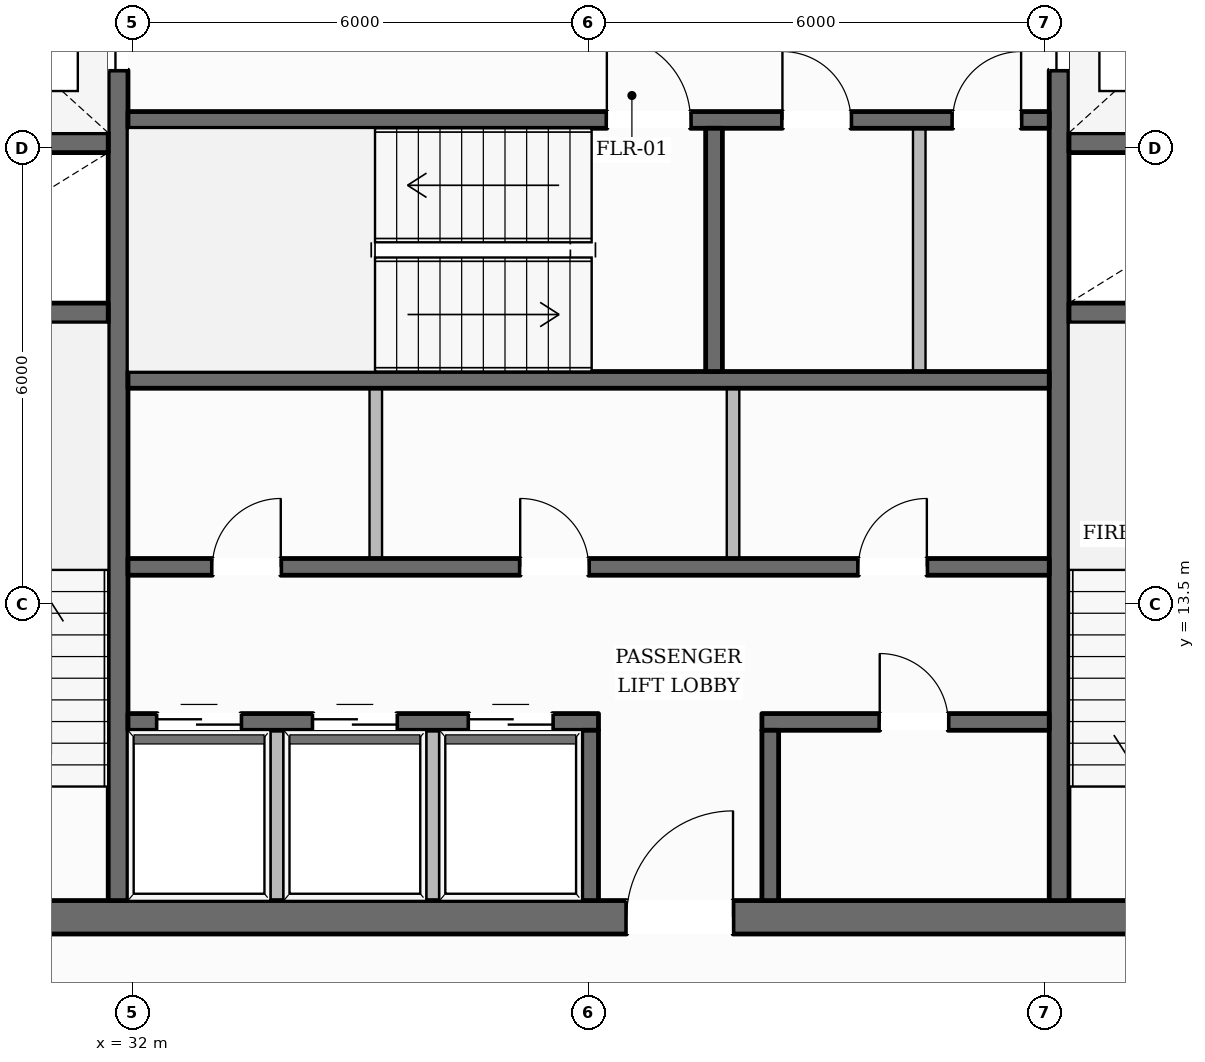
"""IFC4 building model, lengths in metres.
Left out: names, types, materials, properties, quantities, classifications, styles, units other than length and angle.
Written with IfcOpenShell. Run it as: python <this file> out.ifc"""

import sys

from ifc_helpers import new_model, si_unit, direction, frame, frame_2d, origin, place, context, subcontext, project, spatial, rectangle, extrude, element, fill, save


model = new_model("IFC4")
c1 = context("Model", 3, precision=1e-05, world=origin(), true_north=direction((0.0, 1.0)))
c2 = subcontext(c1, "Body", "Model", "MODEL_VIEW")
j1 = project(units=[si_unit("LENGTHUNIT", "METRE"), si_unit("PLANEANGLEUNIT", "RADIAN")], contexts=[c1])
p1 = place(None, origin())
s1 = spatial("IfcSite", under=j1, at=p1, CompositionType="ELEMENT")
p2 = place(p1, origin())
s2 = spatial("IfcBuilding", under=s1, at=p2, CompositionType="ELEMENT")
p3 = place(p2, frame((0.0, 0.0, 218.9)))
s3 = spatial("IfcBuildingStorey", under=s2, at=p3, CompositionType="ELEMENT", Elevation=218.9)
p4 = place(p3, frame((28.04, 9.38, 0.0), z_axis=(0.0, 0.0, 1.0), x_axis=(1.0, 0.0, 0.0)))
e1 = element("IfcWall", 1, at=p4, inside=s3, PredefinedType="SOLIDWALL", context=c2, shape_type="SweptSolid", body=[
    extrude(rectangle(XDim=19.92, YDim=0.44, at=frame_2d((9.96, 0.0))), origin(), (0.0, 0.0, 1.0), 3.6),
])
p5 = place(p4, frame((10.46, 0.0, 0.0)))
e2 = element("IfcOpeningElement", 2, at=p5, cuts=e1, PredefinedType="OPENING", context=c2, shape_type="SweptSolid", body=[
    extrude(rectangle(XDim=1.4, YDim=2.2, at=frame_2d((0.7, 1.1))), frame((0.0, 0.23, 0.0), z_axis=(0.0, -1.0, 0.0), x_axis=(1.0, 0.0, 0.0)), (0.0, 0.0, 1.0), 0.46),
])
p6 = place(p3, frame((31.81, 9.6, 0.0), z_axis=(0.0, 0.0, 1.0), x_axis=(0.0, 1.0, 0.0)))
e3 = element("IfcWall", 3, at=p6, inside=s3, PredefinedType="SHEAR", context=c2, shape_type="SweptSolid", body=[
    extrude(rectangle(XDim=13.0, YDim=0.26, at=frame_2d((6.5, 0.0))), origin(), (0.0, 0.0, 1.0), 3.6),
])
p7 = place(p6, frame((10.925, 0.0, 0.0)))
e4 = element("IfcOpeningElement", 4, at=p7, cuts=e3, PredefinedType="OPENING", context=c2, shape_type="SweptSolid", body=[
    extrude(rectangle(XDim=1.25, YDim=2.25, at=frame_2d((0.625, 1.125))), frame((0.0, 0.14, 0.0), z_axis=(0.0, -1.0, 0.0), x_axis=(1.0, 0.0, 0.0)), (0.0, 0.0, 1.0), 0.28),
])
p8 = place(p3, frame((44.19, 9.6, 0.0), z_axis=(0.0, 0.0, 1.0), x_axis=(0.0, 1.0, 0.0)))
e5 = element("IfcWall", 5, at=p8, inside=s3, PredefinedType="SHEAR", context=c2, shape_type="SweptSolid", body=[
    extrude(rectangle(XDim=13.0, YDim=0.26, at=frame_2d((6.5, 0.0))), origin(), (0.0, 0.0, 1.0), 3.6),
])
p9 = place(p8, frame((10.925, 0.0, 0.0)))
e6 = element("IfcOpeningElement", 6, at=p9, cuts=e5, PredefinedType="OPENING", context=c2, shape_type="SweptSolid", body=[
    extrude(rectangle(XDim=1.25, YDim=2.25, at=frame_2d((0.625, 1.125))), frame((0.0, 0.14, 0.0), z_axis=(0.0, -1.0, 0.0), x_axis=(1.0, 0.0, 0.0)), (0.0, 0.0, 1.0), 0.28),
])
for number, where, z_axis, x_axis in (
    (7, (28.48, 17.33, 0.0), (0.0, 0.0, 1.0), (1.0, 0.0, 0.0)),
    (8, (28.48, 19.57, 0.0), (0.0, 0.0, 1.0), (1.0, 0.0, 0.0)),
    (9, (44.32, 17.33, 0.0), (0.0, 0.0, 1.0), (1.0, 0.0, 0.0)),
    (10, (44.32, 19.57, 0.0), (0.0, 0.0, 1.0), (1.0, 0.0, 0.0)),
):
    element("IfcWall", number, at=place(p3, frame(where, z_axis=z_axis, x_axis=x_axis)), inside=s3, PredefinedType="SHEAR", context=c2, shape_type="SweptSolid", body=[
        extrude(rectangle(XDim=3.2, YDim=0.26, at=frame_2d((1.6, 0.0))), origin(), (0.0, 0.0, 1.0), 3.6),
    ])
p10 = place(p3, frame((31.94, 19.87, 0.0), z_axis=(0.0, 0.0, 1.0), x_axis=(1.0, 0.0, 0.0)))
e11 = element("IfcWall", 11, at=p10, inside=s3, PredefinedType="SOLIDWALL", context=c2, shape_type="SweptSolid", body=[
    extrude(rectangle(XDim=12.12, YDim=0.22, at=frame_2d((6.06, 0.0))), origin(), (0.0, 0.0, 1.0), 3.6),
])
p11 = place(p10, frame((6.3, 0.0, 0.0)))
e12 = element("IfcOpeningElement", 12, at=p11, cuts=e11, PredefinedType="OPENING", context=c2, shape_type="SweptSolid", body=[
    extrude(rectangle(XDim=1.1, YDim=2.15, at=frame_2d((0.55, 1.075))), frame((0.0, 0.12, 0.0), z_axis=(0.0, -1.0, 0.0), x_axis=(1.0, 0.0, 0.0)), (0.0, 0.0, 1.0), 0.24),
])
p12 = place(p10, frame((8.61, 0.0, 0.0)))
e13 = element("IfcOpeningElement", 13, at=p12, cuts=e11, PredefinedType="OPENING", context=c2, shape_type="SweptSolid", body=[
    extrude(rectangle(XDim=0.9, YDim=2.1, at=frame_2d((0.45, 1.05))), frame((0.0, 0.12, 0.0), z_axis=(0.0, -1.0, 0.0), x_axis=(1.0, 0.0, 0.0)), (0.0, 0.0, 1.0), 0.24),
])
p13 = place(p10, frame((10.85, 0.0, 0.0)))
e14 = element("IfcOpeningElement", 14, at=p13, cuts=e11, PredefinedType="OPENING", context=c2, shape_type="SweptSolid", body=[
    extrude(rectangle(XDim=0.9, YDim=2.1, at=frame_2d((0.45, 1.05))), frame((0.0, 0.12, 0.0), z_axis=(0.0, -1.0, 0.0), x_axis=(1.0, 0.0, 0.0)), (0.0, 0.0, 1.0), 0.24),
])
p14 = place(p3, frame((31.94, 16.45, 0.0), z_axis=(0.0, 0.0, 1.0), x_axis=(1.0, 0.0, 0.0)))
e15 = element("IfcWall", 15, at=p14, inside=s3, PredefinedType="SOLIDWALL", context=c2, shape_type="SweptSolid", body=[
    extrude(rectangle(XDim=12.12, YDim=0.22, at=frame_2d((6.06, 0.0))), origin(), (0.0, 0.0, 1.0), 3.6),
])
p15 = place(p3, frame((39.65, 16.56, 0.0), z_axis=(0.0, 0.0, 1.0), x_axis=(0.0, 1.0, 0.0)))
e16 = element("IfcWall", 16, at=p15, inside=s3, PredefinedType="SOLIDWALL", context=c2, shape_type="SweptSolid", body=[
    extrude(rectangle(XDim=3.2, YDim=0.22, at=frame_2d((1.6, 0.0))), origin(), (0.0, 0.0, 1.0), 3.6),
])
p16 = place(p3, frame((31.94, 13.99, 0.0), z_axis=(0.0, 0.0, 1.0), x_axis=(1.0, 0.0, 0.0)))
e17 = element("IfcWall", 17, at=p16, inside=s3, PredefinedType="SOLIDWALL", context=c2, shape_type="SweptSolid", body=[
    extrude(rectangle(XDim=12.12, YDim=0.22, at=frame_2d((6.06, 0.0))), origin(), (0.0, 0.0, 1.0), 3.6),
])
p17 = place(p16, frame((1.11, 0.0, 0.0)))
e18 = element("IfcOpeningElement", 18, at=p17, cuts=e17, PredefinedType="OPENING", context=c2, shape_type="SweptSolid", body=[
    extrude(rectangle(XDim=0.9, YDim=2.1, at=frame_2d((0.45, 1.05))), frame((0.0, 0.12, 0.0), z_axis=(0.0, -1.0, 0.0), x_axis=(1.0, 0.0, 0.0)), (0.0, 0.0, 1.0), 0.24),
])
p18 = place(p16, frame((5.16, 0.0, 0.0)))
e19 = element("IfcOpeningElement", 19, at=p18, cuts=e17, PredefinedType="OPENING", context=c2, shape_type="SweptSolid", body=[
    extrude(rectangle(XDim=0.9, YDim=2.1, at=frame_2d((0.45, 1.05))), frame((0.0, 0.12, 0.0), z_axis=(0.0, -1.0, 0.0), x_axis=(1.0, 0.0, 0.0)), (0.0, 0.0, 1.0), 0.24),
])
p19 = place(p16, frame((9.61, 0.0, 0.0)))
e20 = element("IfcOpeningElement", 20, at=p19, cuts=e17, PredefinedType="OPENING", context=c2, shape_type="SweptSolid", body=[
    extrude(rectangle(XDim=0.9, YDim=2.1, at=frame_2d((0.45, 1.05))), frame((0.0, 0.12, 0.0), z_axis=(0.0, -1.0, 0.0), x_axis=(1.0, 0.0, 0.0)), (0.0, 0.0, 1.0), 0.24),
])
p20 = place(p3, frame((31.94, 11.95, 0.0), z_axis=(0.0, 0.0, 1.0), x_axis=(1.0, 0.0, 0.0)))
e21 = element("IfcWall", 21, at=p20, inside=s3, PredefinedType="SOLIDWALL", context=c2, shape_type="SweptSolid", body=[
    extrude(rectangle(XDim=6.19, YDim=0.22, at=frame_2d((3.095, 0.0))), origin(), (0.0, 0.0, 1.0), 3.6),
])
p21 = place(p20, frame((0.385, 0.0, 0.0)))
e22 = element("IfcOpeningElement", 22, at=p21, cuts=e21, PredefinedType="OPENING", context=c2, shape_type="SweptSolid", body=[
    extrude(rectangle(XDim=1.1, YDim=2.2, at=frame_2d((0.55, 1.1))), frame((0.0, 0.12, 0.0), z_axis=(0.0, -1.0, 0.0), x_axis=(1.0, 0.0, 0.0)), (0.0, 0.0, 1.0), 0.24),
])
p22 = place(p20, frame((2.435, 0.0, 0.0)))
e23 = element("IfcOpeningElement", 23, at=p22, cuts=e21, PredefinedType="OPENING", context=c2, shape_type="SweptSolid", body=[
    extrude(rectangle(XDim=1.1, YDim=2.2, at=frame_2d((0.55, 1.1))), frame((0.0, 0.12, 0.0), z_axis=(0.0, -1.0, 0.0), x_axis=(1.0, 0.0, 0.0)), (0.0, 0.0, 1.0), 0.24),
])
p23 = place(p20, frame((4.485, 0.0, 0.0)))
e24 = element("IfcOpeningElement", 24, at=p23, cuts=e21, PredefinedType="OPENING", context=c2, shape_type="SweptSolid", body=[
    extrude(rectangle(XDim=1.1, YDim=2.2, at=frame_2d((0.55, 1.1))), frame((0.0, 0.12, 0.0), z_axis=(0.0, -1.0, 0.0), x_axis=(1.0, 0.0, 0.0)), (0.0, 0.0, 1.0), 0.24),
])
p24 = place(p3, frame((40.28, 11.95, 0.0), z_axis=(0.0, 0.0, 1.0), x_axis=(1.0, 0.0, 0.0)))
e25 = element("IfcWall", 25, at=p24, inside=s3, PredefinedType="SOLIDWALL", context=c2, shape_type="SweptSolid", body=[
    extrude(rectangle(XDim=3.78, YDim=0.22, at=frame_2d((1.89, 0.0))), origin(), (0.0, 0.0, 1.0), 3.6),
])
p25 = place(p24, frame((1.55, 0.0, 0.0)))
e26 = element("IfcOpeningElement", 26, at=p25, cuts=e25, PredefinedType="OPENING", context=c2, shape_type="SweptSolid", body=[
    extrude(rectangle(XDim=0.9, YDim=2.1, at=frame_2d((0.45, 1.05))), frame((0.0, 0.12, 0.0), z_axis=(0.0, -1.0, 0.0), x_axis=(1.0, 0.0, 0.0)), (0.0, 0.0, 1.0), 0.24),
])
for number, where, z_axis, x_axis in (
    (27, (38.02, 9.6, 0.0), (0.0, 0.0, 1.0), (0.0, 1.0, 0.0)),
    (28, (40.39, 9.6, 0.0), (0.0, 0.0, 1.0), (0.0, 1.0, 0.0)),
):
    element("IfcWall", number, at=place(p3, frame(where, z_axis=z_axis, x_axis=x_axis)), inside=s3, PredefinedType="SOLIDWALL", context=c2, shape_type="SweptSolid", body=[
        extrude(rectangle(XDim=2.24, YDim=0.22, at=frame_2d((1.12, 0.0))), origin(), (0.0, 0.0, 1.0), 3.6),
    ])
p26 = place(p3, frame((14.171, 10.807, 0.0), z_axis=(0.0, 0.0, 1.0), x_axis=(0.504226548845, 0.86357141421, 0.0)))
e29 = element("IfcWall", 29, at=p26, inside=s3, PredefinedType="STANDARD", context=c2, shape_type="SweptSolid", body=[
    extrude(rectangle(XDim=39.276, YDim=0.35, at=frame_2d((19.638, 0.0))), origin(), (0.0, 0.0, 1.0), 3.132),
])
p27 = place(p26, frame((34.885, 0.0, 0.65)))
e30 = element("IfcOpeningElement", 30, at=p27, cuts=e29, PredefinedType="OPENING", context=c2, shape_type="SweptSolid", body=[
    extrude(rectangle(XDim=1.45, YDim=1.75, at=frame_2d((0.725, 0.875))), frame((0.0, 0.185, 0.0), z_axis=(0.0, -1.0, 0.0), x_axis=(1.0, 0.0, 0.0)), (0.0, 0.0, 1.0), 0.37),
])
p28 = place(p26, frame((28.497, 0.0, 0.65)))
e31 = element("IfcOpeningElement", 31, at=p28, cuts=e29, PredefinedType="OPENING", context=c2, shape_type="SweptSolid", body=[
    extrude(rectangle(XDim=1.45, YDim=1.75, at=frame_2d((0.725, 0.875))), frame((0.0, 0.185, 0.0), z_axis=(0.0, -1.0, 0.0), x_axis=(1.0, 0.0, 0.0)), (0.0, 0.0, 1.0), 0.37),
])
p29 = place(p26, frame((15.722, 0.0, 0.65)))
e32 = element("IfcOpeningElement", 32, at=p29, cuts=e29, PredefinedType="OPENING", context=c2, shape_type="SweptSolid", body=[
    extrude(rectangle(XDim=1.45, YDim=1.75, at=frame_2d((0.725, 0.875))), frame((0.0, 0.185, 0.0), z_axis=(0.0, -1.0, 0.0), x_axis=(1.0, 0.0, 0.0)), (0.0, 0.0, 1.0), 0.37),
])
p30 = place(p26, frame((9.334, 0.0, 0.65)))
e33 = element("IfcOpeningElement", 33, at=p30, cuts=e29, PredefinedType="OPENING", context=c2, shape_type="SweptSolid", body=[
    extrude(rectangle(XDim=1.45, YDim=1.75, at=frame_2d((0.725, 0.875))), frame((0.0, 0.185, 0.0), z_axis=(0.0, -1.0, 0.0), x_axis=(1.0, 0.0, 0.0)), (0.0, 0.0, 1.0), 0.37),
])
p31 = place(p26, frame((2.946, 0.0, 0.65)))
e34 = element("IfcOpeningElement", 34, at=p31, cuts=e29, PredefinedType="OPENING", context=c2, shape_type="SweptSolid", body=[
    extrude(rectangle(XDim=1.45, YDim=1.75, at=frame_2d((0.725, 0.875))), frame((0.0, 0.185, 0.0), z_axis=(0.0, -1.0, 0.0), x_axis=(1.0, 0.0, 0.0)), (0.0, 0.0, 1.0), 0.37),
])
p32 = place(p3, frame((41.881, 44.812, 0.0), z_axis=(0.0, 0.0, 1.0), x_axis=(0.495686807291, -0.868501346618, 0.0)))
e35 = element("IfcWall", 35, at=p32, inside=s3, PredefinedType="STANDARD", context=c2, shape_type="SweptSolid", body=[
    extrude(rectangle(XDim=38.618, YDim=0.35, at=frame_2d((19.309, 0.0))), origin(), (0.0, 0.0, 1.0), 3.132),
])
p33 = place(p32, frame((34.278, 0.0, 0.65)))
e36 = element("IfcOpeningElement", 36, at=p33, cuts=e35, PredefinedType="OPENING", context=c2, shape_type="SweptSolid", body=[
    extrude(rectangle(XDim=1.45, YDim=1.75, at=frame_2d((0.725, 0.875))), frame((0.0, 0.185, 0.0), z_axis=(0.0, -1.0, 0.0), x_axis=(1.0, 0.0, 0.0)), (0.0, 0.0, 1.0), 0.37),
])
p34 = place(p32, frame((28.001, 0.0, 0.65)))
e37 = element("IfcOpeningElement", 37, at=p34, cuts=e35, PredefinedType="OPENING", context=c2, shape_type="SweptSolid", body=[
    extrude(rectangle(XDim=1.45, YDim=1.75, at=frame_2d((0.725, 0.875))), frame((0.0, 0.185, 0.0), z_axis=(0.0, -1.0, 0.0), x_axis=(1.0, 0.0, 0.0)), (0.0, 0.0, 1.0), 0.37),
])
p35 = place(p32, frame((15.448, 0.0, 0.65)))
e38 = element("IfcOpeningElement", 38, at=p35, cuts=e35, PredefinedType="OPENING", context=c2, shape_type="SweptSolid", body=[
    extrude(rectangle(XDim=1.45, YDim=1.75, at=frame_2d((0.725, 0.875))), frame((0.0, 0.185, 0.0), z_axis=(0.0, -1.0, 0.0), x_axis=(1.0, 0.0, 0.0)), (0.0, 0.0, 1.0), 0.37),
])
p36 = place(p32, frame((9.172, 0.0, 0.65)))
e39 = element("IfcOpeningElement", 39, at=p36, cuts=e35, PredefinedType="OPENING", context=c2, shape_type="SweptSolid", body=[
    extrude(rectangle(XDim=1.45, YDim=1.75, at=frame_2d((0.725, 0.875))), frame((0.0, 0.185, 0.0), z_axis=(0.0, -1.0, 0.0), x_axis=(1.0, 0.0, 0.0)), (0.0, 0.0, 1.0), 0.37),
])
p37 = place(p32, frame((2.895, 0.0, 0.65)))
e40 = element("IfcOpeningElement", 40, at=p37, cuts=e35, PredefinedType="OPENING", context=c2, shape_type="SweptSolid", body=[
    extrude(rectangle(XDim=1.45, YDim=1.75, at=frame_2d((0.725, 0.875))), frame((0.0, 0.185, 0.0), z_axis=(0.0, -1.0, 0.0), x_axis=(1.0, 0.0, 0.0)), (0.0, 0.0, 1.0), 0.37),
])
for number, where, z_axis, x_axis in (
    (41, (33.9, 9.52, 0.0), (0.0, 0.0, 1.0), (0.0, 1.0, 0.0)),
    (42, (35.95, 9.52, 0.0), (0.0, 0.0, 1.0), (0.0, 1.0, 0.0)),
):
    element("IfcWall", number, at=place(p3, frame(where, z_axis=z_axis, x_axis=x_axis)), inside=s3, PredefinedType="PARTITIONING", context=c2, shape_type="SweptSolid", body=[
        extrude(rectangle(XDim=2.32, YDim=0.165, at=frame_2d((1.16, 0.0))), origin(), (0.0, 0.0, 1.0), 3.6),
    ])
for number, where, z_axis, x_axis in (
    (43, (35.2, 14.1, 0.0), (0.0, 0.0, 1.0), (0.0, 1.0, 0.0)),
    (44, (39.9, 14.1, 0.0), (0.0, 0.0, 1.0), (0.0, 1.0, 0.0)),
):
    element("IfcWall", number, at=place(p3, frame(where, z_axis=z_axis, x_axis=x_axis)), inside=s3, PredefinedType="PARTITIONING", context=c2, shape_type="SweptSolid", body=[
        extrude(rectangle(XDim=2.24, YDim=0.165, at=frame_2d((1.12, 0.0))), origin(), (0.0, 0.0, 1.0), 3.6),
    ])
p38 = place(p3, frame((42.35, 16.56, 0.0), z_axis=(0.0, 0.0, 1.0), x_axis=(0.0, 1.0, 0.0)))
e45 = element("IfcWall", 45, at=p38, inside=s3, PredefinedType="PARTITIONING", context=c2, shape_type="SweptSolid", body=[
    extrude(rectangle(XDim=3.2, YDim=0.165, at=frame_2d((1.6, 0.0))), origin(), (0.0, 0.0, 1.0), 3.6),
])
p39 = place(p11, origin())
e46 = element("IfcDoor", 46, at=p39, inside=s3, OperationType="SINGLE_SWING_LEFT", PredefinedType="DOOR", context=c2, shape_type="SweptSolid", body=[
    extrude(rectangle(XDim=1.1, YDim=2.15, at=frame_2d((0.55, 1.075))), frame((0.0, 0.025, 0.0), z_axis=(0.0, -1.0, 0.0), x_axis=(1.0, 0.0, 0.0)), (0.0, 0.0, 1.0), 0.05),
])
fill(e12, e46)
p40 = place(p7, origin())
e47 = element("IfcDoor", 47, at=p40, inside=s3, OperationType="DOUBLE_DOOR_SLIDING", PredefinedType="DOOR", context=c2, shape_type="SweptSolid", body=[
    extrude(rectangle(XDim=1.25, YDim=2.25, at=frame_2d((0.625, 1.125))), frame((0.0, 0.025, 0.0), z_axis=(0.0, -1.0, 0.0), x_axis=(1.0, 0.0, 0.0)), (0.0, 0.0, 1.0), 0.05),
])
fill(e4, e47)
p41 = place(p9, origin())
e48 = element("IfcDoor", 48, at=p41, inside=s3, OperationType="DOUBLE_DOOR_SLIDING", PredefinedType="DOOR", context=c2, shape_type="SweptSolid", body=[
    extrude(rectangle(XDim=1.25, YDim=2.25, at=frame_2d((0.625, 1.125))), frame((0.0, 0.025, 0.0), z_axis=(0.0, -1.0, 0.0), x_axis=(1.0, 0.0, 0.0)), (0.0, 0.0, 1.0), 0.05),
])
fill(e6, e48)
p42 = place(p5, origin())
e49 = element("IfcDoor", 49, at=p42, inside=s3, OperationType="SINGLE_SWING_RIGHT", PredefinedType="DOOR", context=c2, shape_type="SweptSolid", body=[
    extrude(rectangle(XDim=1.4, YDim=2.2, at=frame_2d((0.7, 1.1))), frame((0.0, 0.025, 0.0), z_axis=(0.0, -1.0, 0.0), x_axis=(1.0, 0.0, 0.0)), (0.0, 0.0, 1.0), 0.05),
])
fill(e2, e49)
p43 = place(p21, origin())
e50 = element("IfcDoor", 50, at=p43, inside=s3, OperationType="DOUBLE_DOOR_SLIDING", PredefinedType="DOOR", context=c2, shape_type="SweptSolid", body=[
    extrude(rectangle(XDim=1.1, YDim=2.2, at=frame_2d((0.55, 1.1))), frame((0.0, 0.025, 0.0), z_axis=(0.0, -1.0, 0.0), x_axis=(1.0, 0.0, 0.0)), (0.0, 0.0, 1.0), 0.05),
])
fill(e22, e50)
p44 = place(p22, origin())
e51 = element("IfcDoor", 51, at=p44, inside=s3, OperationType="DOUBLE_DOOR_SLIDING", PredefinedType="DOOR", context=c2, shape_type="SweptSolid", body=[
    extrude(rectangle(XDim=1.1, YDim=2.2, at=frame_2d((0.55, 1.1))), frame((0.0, 0.025, 0.0), z_axis=(0.0, -1.0, 0.0), x_axis=(1.0, 0.0, 0.0)), (0.0, 0.0, 1.0), 0.05),
])
fill(e23, e51)
p45 = place(p23, origin())
e52 = element("IfcDoor", 52, at=p45, inside=s3, OperationType="DOUBLE_DOOR_SLIDING", PredefinedType="DOOR", context=c2, shape_type="SweptSolid", body=[
    extrude(rectangle(XDim=1.1, YDim=2.2, at=frame_2d((0.55, 1.1))), frame((0.0, 0.025, 0.0), z_axis=(0.0, -1.0, 0.0), x_axis=(1.0, 0.0, 0.0)), (0.0, 0.0, 1.0), 0.05),
])
fill(e24, e52)
p46 = place(p17, origin())
e53 = element("IfcDoor", 53, at=p46, inside=s3, OperationType="SINGLE_SWING_RIGHT", PredefinedType="DOOR", context=c2, shape_type="SweptSolid", body=[
    extrude(rectangle(XDim=0.9, YDim=2.1, at=frame_2d((0.45, 1.05))), frame((0.0, 0.025, 0.0), z_axis=(0.0, -1.0, 0.0), x_axis=(1.0, 0.0, 0.0)), (0.0, 0.0, 1.0), 0.05),
])
fill(e18, e53)
p47 = place(p18, origin())
e54 = element("IfcDoor", 54, at=p47, inside=s3, OperationType="SINGLE_SWING_LEFT", PredefinedType="DOOR", context=c2, shape_type="SweptSolid", body=[
    extrude(rectangle(XDim=0.9, YDim=2.1, at=frame_2d((0.45, 1.05))), frame((0.0, 0.025, 0.0), z_axis=(0.0, -1.0, 0.0), x_axis=(1.0, 0.0, 0.0)), (0.0, 0.0, 1.0), 0.05),
])
fill(e19, e54)
p48 = place(p19, origin())
e55 = element("IfcDoor", 55, at=p48, inside=s3, OperationType="SINGLE_SWING_RIGHT", PredefinedType="DOOR", context=c2, shape_type="SweptSolid", body=[
    extrude(rectangle(XDim=0.9, YDim=2.1, at=frame_2d((0.45, 1.05))), frame((0.0, 0.025, 0.0), z_axis=(0.0, -1.0, 0.0), x_axis=(1.0, 0.0, 0.0)), (0.0, 0.0, 1.0), 0.05),
])
fill(e20, e55)
p49 = place(p12, origin())
e56 = element("IfcDoor", 56, at=p49, inside=s3, OperationType="SINGLE_SWING_LEFT", PredefinedType="DOOR", context=c2, shape_type="SweptSolid", body=[
    extrude(rectangle(XDim=0.9, YDim=2.1, at=frame_2d((0.45, 1.05))), frame((0.0, 0.025, 0.0), z_axis=(0.0, -1.0, 0.0), x_axis=(1.0, 0.0, 0.0)), (0.0, 0.0, 1.0), 0.05),
])
fill(e13, e56)
p50 = place(p13, origin())
e57 = element("IfcDoor", 57, at=p50, inside=s3, OperationType="SINGLE_SWING_RIGHT", PredefinedType="DOOR", context=c2, shape_type="SweptSolid", body=[
    extrude(rectangle(XDim=0.9, YDim=2.1, at=frame_2d((0.45, 1.05))), frame((0.0, 0.025, 0.0), z_axis=(0.0, -1.0, 0.0), x_axis=(1.0, 0.0, 0.0)), (0.0, 0.0, 1.0), 0.05),
])
fill(e14, e57)
p51 = place(p25, origin())
e58 = element("IfcDoor", 58, at=p51, inside=s3, OperationType="SINGLE_SWING_LEFT", PredefinedType="DOOR", context=c2, shape_type="SweptSolid", body=[
    extrude(rectangle(XDim=0.9, YDim=2.1, at=frame_2d((0.45, 1.05))), frame((0.0, 0.025, 0.0), z_axis=(0.0, -1.0, 0.0), x_axis=(1.0, 0.0, 0.0)), (0.0, 0.0, 1.0), 0.05),
])
fill(e26, e58)
save(model, sys.argv[1])
